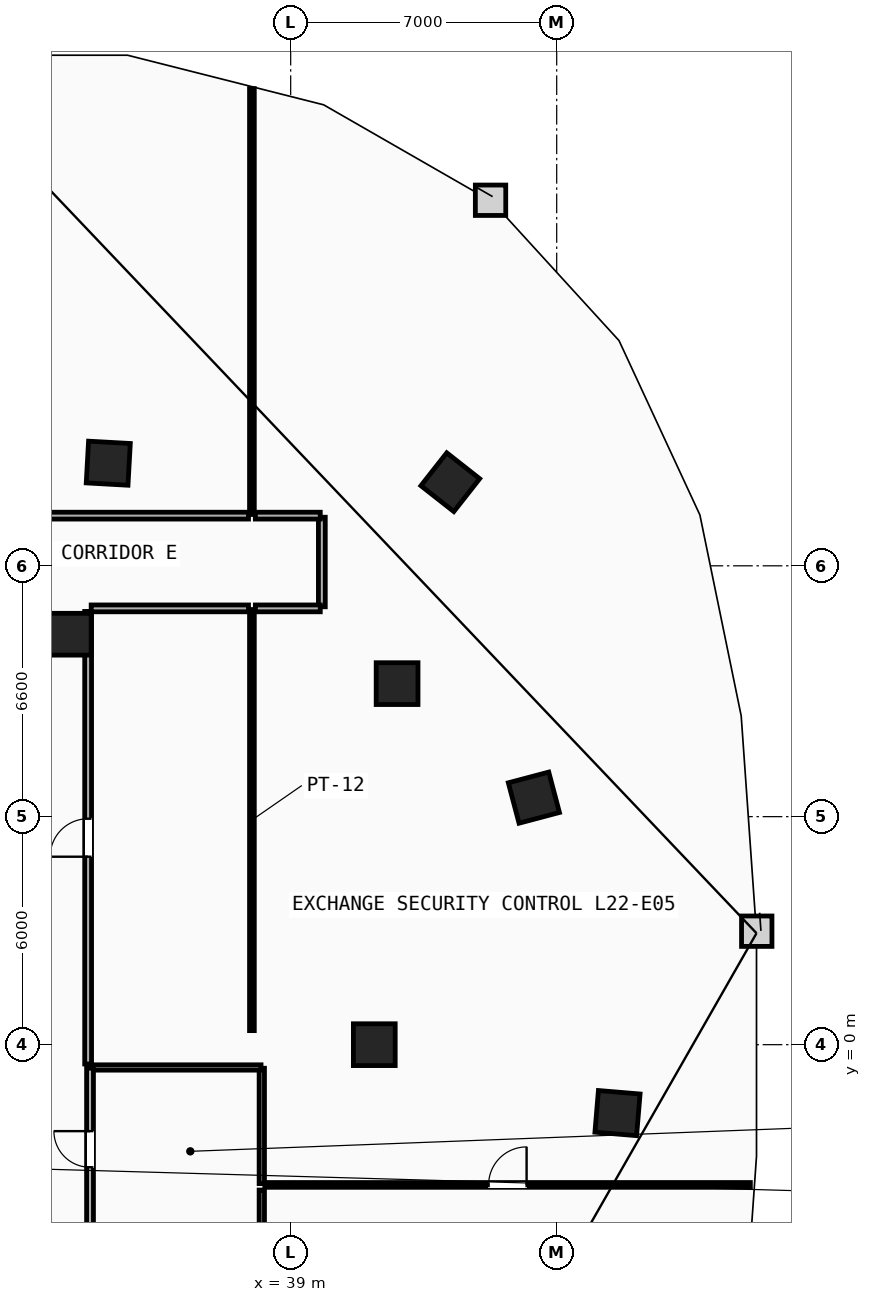
"""IFC4 building model, lengths in metres.
Left out: names, types, materials, properties, quantities, classifications, styles, units other than length and angle.
Written with IfcOpenShell. Run it as: python <this file> out.ifc"""

import sys

from ifc_helpers import new_model, si_unit, direction, frame, frame_2d, origin, origin_2d, place, context, subcontext, project, spatial, rectangle, extrude, element, fill, save


model = new_model("IFC4")
c1 = context("Model", 3, precision=1e-05, world=origin(), true_north=direction((0.0, 1.0)))
c2 = subcontext(c1, "Body", "Model", "MODEL_VIEW")
j1 = project(units=[si_unit("LENGTHUNIT", "METRE"), si_unit("PLANEANGLEUNIT", "RADIAN")], contexts=[c1])
p1 = place(None, origin())
s1 = spatial("IfcSite", under=j1, at=p1, CompositionType="ELEMENT")
p2 = place(p1, origin())
s2 = spatial("IfcBuilding", under=s1, at=p2, CompositionType="ELEMENT")
p3 = place(p2, frame((0.0, 0.0, 89.0)))
s3 = spatial("IfcBuildingStorey", under=s2, at=p3, CompositionType="ELEMENT", Elevation=89.0)
for number, where, z_axis, x_axis in (
    (1, (41.2, 0.0, 0.0), (0.0, 0.0, 1.0), (1.0, 0.0, 0.0)),
    (2, (41.8, 9.5, 0.0), (0.0, 0.0, 1.0), (1.0, 0.0, 0.0)),
    (3, (33.2, 10.8, 0.0), (0.0, 0.0, 1.0), (1.0, 0.0, 0.0)),
    (4, (47.6, -1.8, 0.0), (0.0, 0.0, 1.0), (0.084, 0.997, 0.0)),
    (5, (45.4, 6.5, 0.0), (0.0, 0.0, 1.0), (-0.256, 0.967, 0.0)),
    (6, (43.2, 14.8, 0.0), (0.0, 0.0, 1.0), (-0.786, 0.618, 0.0)),
    (7, (34.2, 15.3, 0.0), (0.0, 0.0, 1.0), (-0.998, 0.055, 0.0)),
):
    element("IfcColumn", number, at=place(p3, frame(where, z_axis=z_axis, x_axis=x_axis)), inside=s3, PredefinedType="COLUMN", context=c2, shape_type="SweptSolid", body=[
        extrude(rectangle(XDim=1.1, YDim=1.1, at=origin_2d()), origin(), (0.0, 0.0, 1.0), 3.6),
    ])
p4 = place(p3, frame((38.24, -4.895, 0.0), z_axis=(0.0, 0.0, 1.0), x_axis=(0.0, 1.0, 0.0)))
e8 = element("IfcWall", 8, at=p4, inside=s3, PredefinedType="PARTITIONING", context=c2, shape_type="SweptSolid", body=[
    extrude(rectangle(XDim=1.07, YDim=0.14, at=frame_2d((0.535, 0.0))), origin(), (0.0, 0.0, 1.0), 3.3),
])
p5 = place(p3, frame((38.24, -3.655, 0.0), z_axis=(0.0, 0.0, 1.0), x_axis=(0.0, 1.0, 0.0)))
e9 = element("IfcWall", 9, at=p5, inside=s3, PredefinedType="PARTITIONING", context=c2, shape_type="SweptSolid", body=[
    extrude(rectangle(XDim=3.035, YDim=0.14, at=frame_2d((1.518, 0.0))), origin(), (0.0, 0.0, 1.0), 3.3),
])
p6 = place(p3, frame((33.74, -0.6, 0.0), z_axis=(0.0, 0.0, 1.0), x_axis=(1.0, 0.0, 0.0)))
e10 = element("IfcWall", 10, at=p6, inside=s3, PredefinedType="PARTITIONING", context=c2, shape_type="SweptSolid", body=[
    extrude(rectangle(XDim=4.48, YDim=0.14, at=frame_2d((2.24, 0.0))), origin(), (0.0, 0.0, 1.0), 3.3),
])
p7 = place(p3, frame((33.72, -4.88, 0.0), z_axis=(0.0, 0.0, 1.0), x_axis=(0.0, 1.0, 0.0)))
e11 = element("IfcWall", 11, at=p7, inside=s3, PredefinedType="PARTITIONING", context=c2, shape_type="SweptSolid", body=[
    extrude(rectangle(XDim=4.26, YDim=0.18, at=frame_2d((2.13, 0.0))), origin(), (0.0, 0.0, 1.0), 3.3),
])
p8 = place(p7, frame((1.655, 0.0, 0.0)))
e12 = element("IfcOpeningElement", 12, at=p8, cuts=e11, PredefinedType="OPENING", context=c2, shape_type="SweptSolid", body=[
    extrude(rectangle(XDim=0.95, YDim=2.1, at=frame_2d((0.475, 1.05))), frame((0.0, 0.1, 0.0), z_axis=(0.0, -1.0, 0.0), x_axis=(1.0, 0.0, 0.0)), (0.0, 0.0, 1.0), 0.2),
])
p9 = place(p3, frame((37.98, 0.37, 0.0), z_axis=(0.0, 0.0, 1.0), x_axis=(0.0, 1.0, 0.0)))
e13 = element("IfcWall", 13, at=p9, inside=s3, PredefinedType="PARTITIONING", context=c2, shape_type="SweptSolid", body=[
    extrude(rectangle(XDim=11.08, YDim=0.125, at=frame_2d((5.54, 0.0))), origin(), (0.0, 0.0, 1.0), 3.3),
])
p10 = place(p3, frame((37.98, 13.95, 0.0), z_axis=(0.0, 0.0, 1.0), x_axis=(0.0, 1.0, 0.0)))
e14 = element("IfcWall", 14, at=p10, inside=s3, PredefinedType="PARTITIONING", context=c2, shape_type="SweptSolid", body=[
    extrude(rectangle(XDim=11.207, YDim=0.125, at=frame_2d((5.603, 0.0))), origin(), (0.0, 0.0, 1.0), 3.3),
])
p11 = place(p3, frame((37.89, 13.92, 0.0), z_axis=(0.0, 0.0, 1.0), x_axis=(-1.0, 0.0, 0.0)))
e15 = element("IfcWall", 15, at=p11, inside=s3, PredefinedType="PARTITIONING", context=c2, shape_type="SweptSolid", body=[
    extrude(rectangle(XDim=12.668, YDim=0.18, at=frame_2d((6.334, 0.0))), origin(), (0.0, 0.0, 1.0), 3.3),
])
p12 = place(p3, frame((33.67, -0.509, 0.0), z_axis=(0.0, 0.0, 1.0), x_axis=(0.0, 1.0, 0.0)))
e16 = element("IfcWall", 16, at=p12, inside=s3, PredefinedType="PARTITIONING", context=c2, shape_type="SweptSolid", body=[
    extrude(rectangle(XDim=11.908, YDim=0.18, at=frame_2d((5.954, 0.0))), origin(), (0.0, 0.0, 1.0), 3.3),
])
p13 = place(p12, frame((5.454, 0.0, 0.0)))
e17 = element("IfcOpeningElement", 17, at=p13, cuts=e16, PredefinedType="OPENING", context=c2, shape_type="SweptSolid", body=[
    extrude(rectangle(XDim=1.0, YDim=2.15, at=frame_2d((0.5, 1.075))), frame((0.0, 0.1, 0.0), z_axis=(0.0, -1.0, 0.0), x_axis=(1.0, 0.0, 0.0)), (0.0, 0.0, 1.0), 0.2),
])
p14 = place(p3, frame((33.75, 11.48, 0.0), z_axis=(0.0, 0.0, 1.0), x_axis=(1.0, 0.0, 0.0)))
e18 = element("IfcWall", 18, at=p14, inside=s3, PredefinedType="PARTITIONING", context=c2, shape_type="SweptSolid", body=[
    extrude(rectangle(XDim=4.14, YDim=0.18, at=frame_2d((2.07, 0.0))), origin(), (0.0, 0.0, 1.0), 3.3),
])
p15 = place(p3, frame((39.82, 11.521, 0.0), z_axis=(0.0, 0.0, 1.0), x_axis=(0.0, 1.0, 0.0)))
e19 = element("IfcWall", 19, at=p15, inside=s3, PredefinedType="PARTITIONING", context=c2, shape_type="SweptSolid", body=[
    extrude(rectangle(XDim=2.357, YDim=0.18, at=frame_2d((1.178, 0.0))), origin(), (0.0, 0.0, 1.0), 3.3),
])
for number, where, z_axis, x_axis in (
    (20, (38.07, 11.48, 0.0), (0.0, 0.0, 1.0), (1.0, 0.0, 0.0)),
    (21, (39.779, 13.92, 0.0), (0.0, 0.0, 1.0), (-1.0, 0.0, 0.0)),
):
    element("IfcWall", number, at=place(p3, frame(where, z_axis=z_axis, x_axis=x_axis)), inside=s3, PredefinedType="PARTITIONING", context=c2, shape_type="SweptSolid", body=[
        extrude(rectangle(XDim=1.708, YDim=0.18, at=frame_2d((0.854, 0.0))), origin(), (0.0, 0.0, 1.0), 3.3),
    ])
p16 = place(p3, frame((38.32, -3.69, 0.0), z_axis=(0.0, 0.0, 1.0), x_axis=(1.0, 0.0, 0.0)))
e22 = element("IfcWall", 22, at=p16, inside=s3, PredefinedType="PARTITIONING", context=c2, shape_type="SweptSolid", body=[
    extrude(rectangle(XDim=12.776, YDim=0.125, at=frame_2d((6.388, 0.0))), origin(), (0.0, 0.0, 1.0), 3.3),
])
p17 = place(p16, frame((5.888, 0.0, 0.0)))
e23 = element("IfcOpeningElement", 23, at=p17, cuts=e22, PredefinedType="OPENING", context=c2, shape_type="SweptSolid", body=[
    extrude(rectangle(XDim=1.0, YDim=2.15, at=frame_2d((0.5, 1.075))), frame((0.0, 0.073, 0.0), z_axis=(0.0, -1.0, 0.0), x_axis=(1.0, 0.0, 0.0)), (0.0, 0.0, 1.0), 0.145),
])
p18 = place(p17, origin())
e24 = element("IfcDoor", 24, at=p18, inside=s3, OperationType="SINGLE_SWING_RIGHT", PredefinedType="DOOR", context=c2, shape_type="SweptSolid", body=[
    extrude(rectangle(XDim=1.0, YDim=2.15, at=frame_2d((0.5, 1.075))), frame((0.0, 0.025, 0.0), z_axis=(0.0, -1.0, 0.0), x_axis=(1.0, 0.0, 0.0)), (0.0, 0.0, 1.0), 0.05),
])
fill(e23, e24)
p19 = place(p13, origin())
e25 = element("IfcDoor", 25, at=p19, inside=s3, OperationType="SINGLE_SWING_LEFT", PredefinedType="DOOR", context=c2, shape_type="SweptSolid", body=[
    extrude(rectangle(XDim=1.0, YDim=2.15, at=frame_2d((0.5, 1.075))), frame((0.0, 0.025, 0.0), z_axis=(0.0, -1.0, 0.0), x_axis=(1.0, 0.0, 0.0)), (0.0, 0.0, 1.0), 0.05),
])
fill(e17, e25)
p20 = place(p8, origin())
e26 = element("IfcDoor", 26, at=p20, inside=s3, OperationType="SINGLE_SWING_RIGHT", PredefinedType="DOOR", context=c2, shape_type="SweptSolid", body=[
    extrude(rectangle(XDim=0.95, YDim=2.1, at=frame_2d((0.475, 1.05))), frame((0.0, 0.025, 0.0), z_axis=(0.0, -1.0, 0.0), x_axis=(1.0, 0.0, 0.0)), (0.0, 0.0, 1.0), 0.05),
])
fill(e12, e26)
save(model, sys.argv[1])
